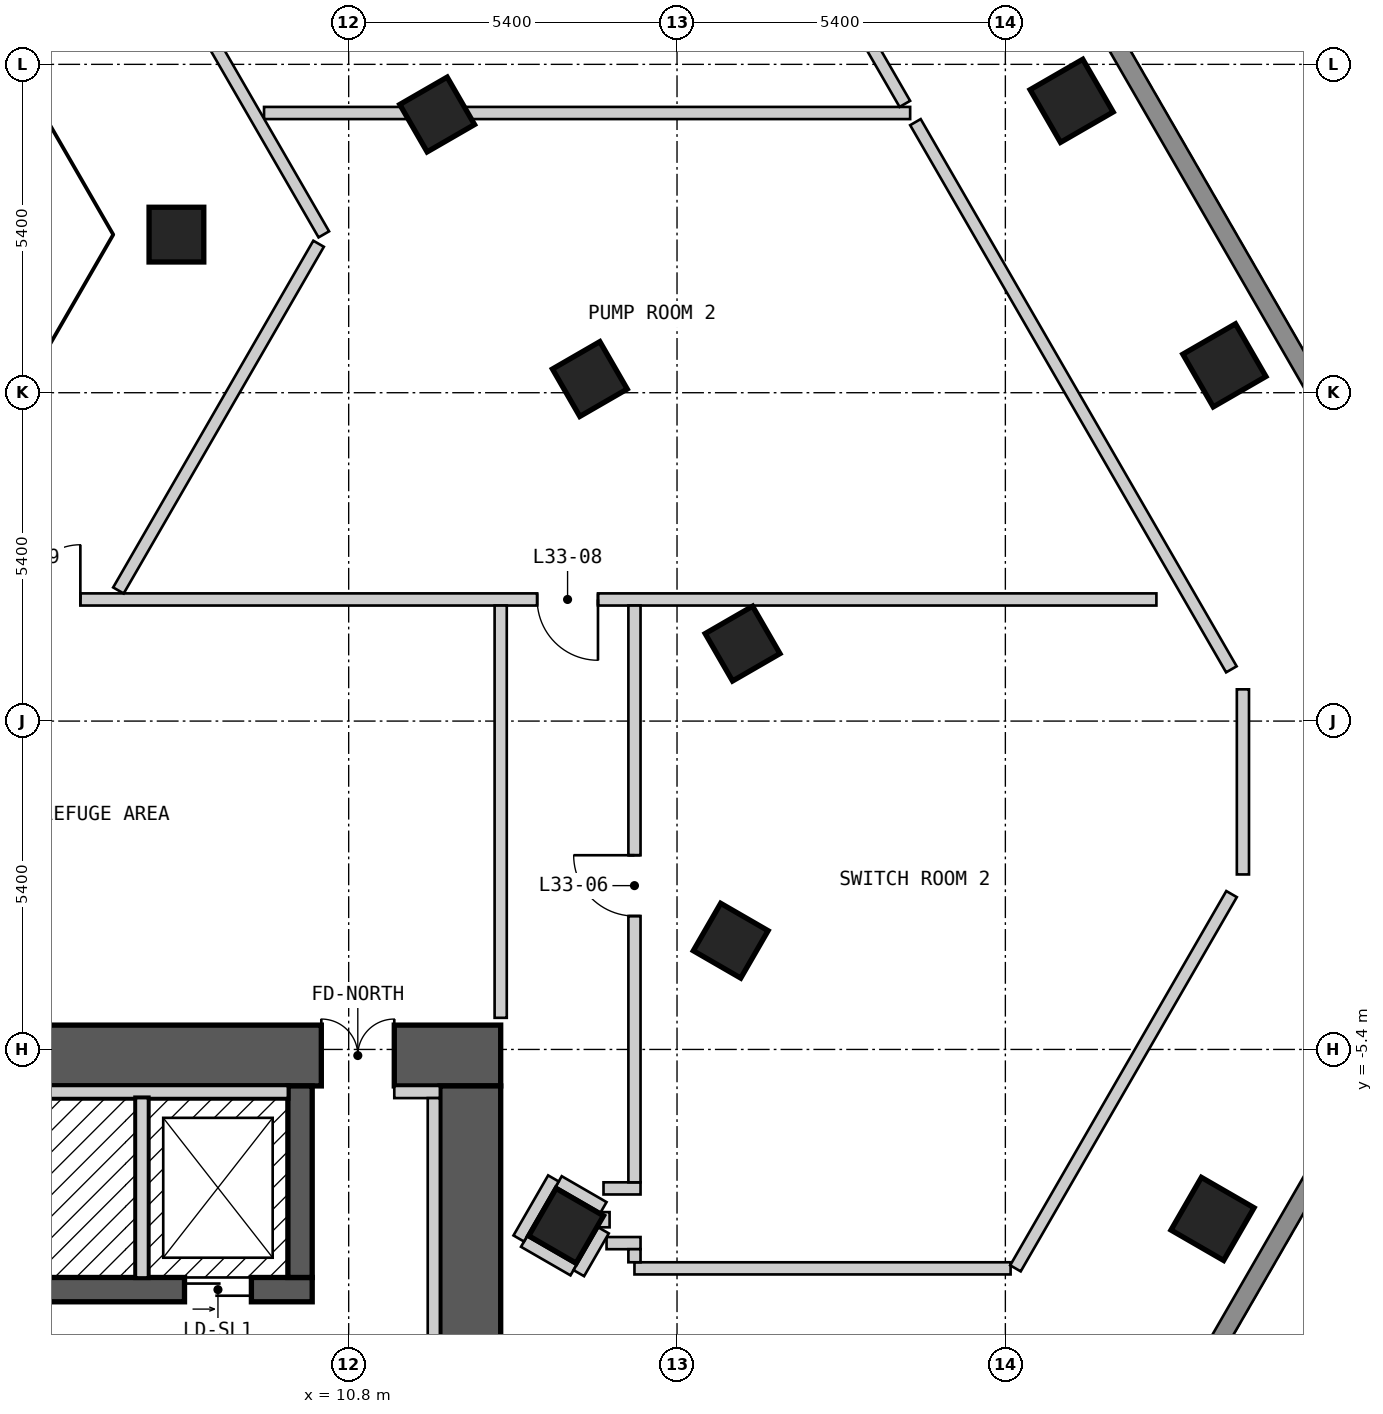
"""IFC4 building model, lengths in metres.
Left out: names, types, materials, properties, quantities, classifications, styles, units other than length and angle.
Written with IfcOpenShell. Run it as: python <this file> out.ifc"""

import sys

from ifc_helpers import new_model, si_unit, direction, frame, frame_2d, origin, origin_2d, place, context, subcontext, project, spatial, polyline, rectangle, outline, extrude, element, fill, save


model = new_model("IFC4")
c1 = context("Model", 3, precision=1e-05, world=origin(), true_north=direction((0.0, 1.0)))
c2 = subcontext(c1, "Body", "Model", "MODEL_VIEW")
j1 = project(units=[si_unit("LENGTHUNIT", "METRE"), si_unit("PLANEANGLEUNIT", "RADIAN")], contexts=[c1])
p1 = place(None, origin())
s1 = spatial("IfcSite", under=j1, at=p1, CompositionType="ELEMENT")
p2 = place(p1, origin())
s2 = spatial("IfcBuilding", under=s1, at=p2, CompositionType="ELEMENT")
p3 = place(p2, frame((0.0, 0.0, 108.0)))
s3 = spatial("IfcBuildingStorey", under=s2, at=p3, CompositionType="ELEMENT", Elevation=108.0)
p4 = place(p3, frame((25.007, -8.187, 0.0), z_axis=(0.0, 0.0, 1.0), x_axis=(0.5, 0.866025403784, 0.0)))
e1 = element("IfcColumn", 1, at=p4, inside=s3, PredefinedType="COLUMN", context=c2, shape_type="SweptSolid", body=[
    extrude(rectangle(XDim=1.0, YDim=1.0, at=origin_2d()), origin(), (0.0, 0.0, 1.0), 2.6),
])
p5 = place(p3, frame((25.202, 5.85, 0.0), z_axis=(0.0, 0.0, 1.0), x_axis=(-0.5, 0.866025403784, 0.0)))
e2 = element("IfcColumn", 2, at=p5, inside=s3, PredefinedType="COLUMN", context=c2, shape_type="SweptSolid", body=[
    extrude(rectangle(XDim=1.0, YDim=1.0, at=origin_2d()), origin(), (0.0, 0.0, 1.0), 3.6),
])
p6 = place(p3, frame((22.69, 10.2, 0.0), z_axis=(0.0, 0.0, 1.0), x_axis=(-0.5, 0.866025403784, 0.0)))
e3 = element("IfcColumn", 3, at=p6, inside=s3, PredefinedType="COLUMN", context=c2, shape_type="SweptSolid", body=[
    extrude(rectangle(XDim=1.0, YDim=1.0, at=origin_2d()), origin(), (0.0, 0.0, 1.0), 2.6),
])
for number, where, z_axis, x_axis in (
    (4, (14.376, -8.3, 0.0), (0.0, 0.0, 1.0), (0.5, 0.866, 0.0)),
    (5, (17.083, -3.612, 0.0), (0.0, 0.0, 1.0), (0.5, 0.866, 0.0)),
):
    element("IfcColumn", number, at=place(p3, frame(where, z_axis=z_axis, x_axis=x_axis)), inside=s3, PredefinedType="COLUMN", context=c2, shape_type="SweptSolid", body=[
        extrude(rectangle(XDim=0.9, YDim=0.9, at=origin_2d()), origin(), (0.0, 0.0, 1.0), 2.6),
    ])
p7 = place(p3, frame((17.278, 1.274, 0.0), z_axis=(0.0, 0.0, 1.0), x_axis=(-0.5, 0.866025403784, 0.0)))
e6 = element("IfcColumn", 6, at=p7, inside=s3, PredefinedType="COLUMN", context=c2, shape_type="SweptSolid", body=[
    extrude(rectangle(XDim=0.9, YDim=0.9, at=origin_2d()), origin(), (0.0, 0.0, 1.0), 3.6),
])
for number, where, z_axis, x_axis in (
    (7, (14.766, 5.625, 0.0), (0.0, 0.0, 1.0), (-0.5, 0.866, 0.0)),
    (8, (12.255, 9.975, 0.0), (0.0, 0.0, 1.0), (-0.5, 0.866, 0.0)),
):
    element("IfcColumn", number, at=place(p3, frame(where, z_axis=z_axis, x_axis=x_axis)), inside=s3, PredefinedType="COLUMN", context=c2, shape_type="SweptSolid", body=[
        extrude(rectangle(XDim=0.9, YDim=0.9, at=origin_2d()), origin(), (0.0, 0.0, 1.0), 2.6),
    ])
p8 = place(p3, frame((7.967, 8.0, 0.0), z_axis=(0.0, 0.0, 1.0), x_axis=(1.0, 0.0, 0.0)))
e9 = element("IfcColumn", 9, at=p8, inside=s3, PredefinedType="COLUMN", context=c2, shape_type="SweptSolid", body=[
    extrude(rectangle(XDim=0.9, YDim=0.9, at=origin_2d()), origin(), (0.0, 0.0, 1.0), 3.6),
])
p9 = place(p3, frame((-13.3, -5.5, 0.0), z_axis=(0.0, 0.0, 1.0), x_axis=(1.0, 0.0, 0.0)))
e10 = element("IfcWall", 10, at=p9, inside=s3, PredefinedType="SHEAR", context=c2, shape_type="SweptSolid", body=[
    extrude(rectangle(XDim=26.6, YDim=1.0, at=frame_2d((13.3, 0.0))), origin(), (0.0, 0.0, 1.0), 2.6),
])
p10 = place(p9, frame((23.65, 0.0, 0.0)))
e11 = element("IfcOpeningElement", 11, at=p10, cuts=e10, PredefinedType="OPENING", context=c2, shape_type="SweptSolid", body=[
    extrude(rectangle(XDim=1.2, YDim=2.1, at=frame_2d((0.6, 1.05))), frame((0.0, 0.51, 0.0), z_axis=(0.0, -1.0, 0.0), x_axis=(1.0, 0.0, 0.0)), (0.0, 0.0, 1.0), 1.02),
])
p11 = place(p3, frame((12.8, -18.0, 0.0), z_axis=(0.0, 0.0, 1.0), x_axis=(0.0, 1.0, 0.0)))
e12 = element("IfcWall", 12, at=p11, inside=s3, PredefinedType="SHEAR", context=c2, shape_type="SweptSolid", body=[
    extrude(rectangle(XDim=12.0, YDim=1.0, at=frame_2d((6.0, 0.0))), origin(), (0.0, 0.0, 1.0), 2.6),
])
p12 = place(p3, frame((-12.3, -9.35, 0.0), z_axis=(0.0, 0.0, 1.0), x_axis=(1.0, 0.0, 0.0)))
e13 = element("IfcWall", 13, at=p12, inside=s3, PredefinedType="SHEAR", context=c2, shape_type="SweptSolid", body=[
    extrude(rectangle(XDim=22.5, YDim=0.4, at=frame_2d((11.25, 0.0))), origin(), (0.0, 0.0, 1.0), 2.6),
])
p13 = place(p12, frame((0.9, 0.0, 0.0)))
e14 = element("IfcOpeningElement", 14, at=p13, cuts=e13, PredefinedType="OPENING", context=c2, shape_type="SweptSolid", body=[
    extrude(rectangle(XDim=1.1, YDim=2.1, at=frame_2d((0.55, 1.05))), frame((0.0, 0.21, 0.0), z_axis=(0.0, -1.0, 0.0), x_axis=(1.0, 0.0, 0.0)), (0.0, 0.0, 1.0), 0.42),
])
p14 = place(p12, frame((3.7, 0.0, 0.0)))
e15 = element("IfcOpeningElement", 15, at=p14, cuts=e13, PredefinedType="OPENING", context=c2, shape_type="SweptSolid", body=[
    extrude(rectangle(XDim=1.1, YDim=2.1, at=frame_2d((0.55, 1.05))), frame((0.0, 0.21, 0.0), z_axis=(0.0, -1.0, 0.0), x_axis=(1.0, 0.0, 0.0)), (0.0, 0.0, 1.0), 0.42),
])
p15 = place(p12, frame((20.4, 0.0, 0.0)))
e16 = element("IfcOpeningElement", 16, at=p15, cuts=e13, PredefinedType="OPENING", context=c2, shape_type="SweptSolid", body=[
    extrude(rectangle(XDim=1.1, YDim=2.1, at=frame_2d((0.55, 1.05))), frame((0.0, 0.21, 0.0), z_axis=(0.0, -1.0, 0.0), x_axis=(1.0, 0.0, 0.0)), (0.0, 0.0, 1.0), 0.42),
])
p16 = place(p3, frame((10.0, -9.15, 0.0), z_axis=(0.0, 0.0, 1.0), x_axis=(0.0, 1.0, 0.0)))
e17 = element("IfcWall", 17, at=p16, inside=s3, PredefinedType="SHEAR", context=c2, shape_type="SweptSolid", body=[
    extrude(rectangle(XDim=3.15, YDim=0.4, at=frame_2d((1.575, 0.0))), origin(), (0.0, 0.0, 1.0), 2.6),
])
p17 = place(p3, frame((17.479, -23.425, 0.0), z_axis=(0.0, 0.0, 1.0), x_axis=(0.500035407905, 0.866004960056, 0.0)))
e18 = element("IfcWall", 18, at=p17, inside=s3, PredefinedType="SOLIDWALL", context=c2, shape_type="SweptSolid", body=[
    extrude(outline(polyline([(0.0, -0.15), (23.094, -0.15), (23.014, 0.15), (0.08, 0.15), (0.0, -0.15)])), origin(), (0.0, 0.0, 1.0), 2.6),
])
p18 = place(p3, frame((29.027, 1.425, 0.0), z_axis=(0.0, 0.0, 1.0), x_axis=(-0.500027479704, 0.866009537788, 0.0)))
e19 = element("IfcWall", 19, at=p18, inside=s3, PredefinedType="SOLIDWALL", context=c2, shape_type="SweptSolid", body=[
    extrude(outline(polyline([(0.0, -0.15), (26.559, -0.15), (26.478, 0.15), (0.08, 0.15), (0.0, -0.15)])), origin(), (0.0, 0.0, 1.0), 2.6),
])
p19 = place(p3, frame((15.5, -9.0, 0.0), z_axis=(0.0, 0.0, 1.0), x_axis=(1.0, 0.0, 0.0)))
e20 = element("IfcWall", 20, at=p19, inside=s3, PredefinedType="SOLIDWALL", context=c2, shape_type="SweptSolid", body=[
    extrude(rectangle(XDim=6.186, YDim=0.2, at=frame_2d((3.093, 0.0))), origin(), (0.0, 0.0, 1.0), 2.6),
])
p20 = place(p3, frame((15.041, -8.585, 0.0), z_axis=(0.0, 0.0, 1.0), x_axis=(1.0, 0.0, 0.0)))
e21 = element("IfcWall", 21, at=p20, inside=s3, PredefinedType="SOLIDWALL", context=c2, shape_type="SweptSolid", body=[
    extrude(rectangle(XDim=0.559, YDim=0.2, at=frame_2d((0.28, 0.0))), origin(), (0.0, 0.0, 1.0), 2.6),
])
p21 = place(p3, frame((14.991, -7.685, 0.0), z_axis=(0.0, 0.0, 1.0), x_axis=(1.0, 0.0, 0.0)))
e22 = element("IfcWall", 22, at=p21, inside=s3, PredefinedType="SOLIDWALL", context=c2, shape_type="SweptSolid", body=[
    extrude(rectangle(XDim=0.609, YDim=0.2, at=frame_2d((0.305, 0.0))), origin(), (0.0, 0.0, 1.0), 2.6),
])
p22 = place(p3, frame((-16.592, 2.0, 0.0), z_axis=(0.0, 0.0, 1.0), x_axis=(1.0, 0.0, 0.0)))
e23 = element("IfcWall", 23, at=p22, inside=s3, PredefinedType="SOLIDWALL", context=c2, shape_type="SweptSolid", body=[
    extrude(rectangle(XDim=40.676, YDim=0.2, at=frame_2d((20.338, 0.0))), origin(), (0.0, 0.0, 1.0), 2.6),
])
p23 = place(p22, frame((0.546, 0.0, 0.0)))
e24 = element("IfcOpeningElement", 24, at=p23, cuts=e23, PredefinedType="OPENING", context=c2, shape_type="SweptSolid", body=[
    extrude(rectangle(XDim=1.8, YDim=2.1, at=frame_2d((0.9, 1.05))), frame((0.0, 0.11, 0.0), z_axis=(0.0, -1.0, 0.0), x_axis=(1.0, 0.0, 0.0)), (0.0, 0.0, 1.0), 0.22),
])
p24 = place(p22, frame((30.492, 0.0, 0.0)))
e25 = element("IfcOpeningElement", 25, at=p24, cuts=e23, PredefinedType="OPENING", context=c2, shape_type="SweptSolid", body=[
    extrude(rectangle(XDim=1.0, YDim=2.1, at=frame_2d((0.5, 1.05))), frame((0.0, 0.11, 0.0), z_axis=(0.0, -1.0, 0.0), x_axis=(1.0, 0.0, 0.0)), (0.0, 0.0, 1.0), 0.22),
])
p25 = place(p22, frame((21.179, 0.0, 0.0)))
e26 = element("IfcOpeningElement", 26, at=p25, cuts=e23, PredefinedType="OPENING", context=c2, shape_type="SweptSolid", body=[
    extrude(rectangle(XDim=1.8, YDim=2.1, at=frame_2d((0.9, 1.05))), frame((0.0, 0.11, 0.0), z_axis=(0.0, -1.0, 0.0), x_axis=(1.0, 0.0, 0.0)), (0.0, 0.0, 1.0), 0.22),
])
p26 = place(p3, frame((9.408, 10.0, 0.0), z_axis=(0.0, 0.0, 1.0), x_axis=(1.0, 0.0, 0.0)))
e27 = element("IfcWall", 27, at=p26, inside=s3, PredefinedType="SOLIDWALL", context=c2, shape_type="SweptSolid", body=[
    extrude(rectangle(XDim=10.626, YDim=0.2, at=frame_2d((5.313, 0.0))), origin(), (0.0, 0.0, 1.0), 2.6),
])
p27 = place(p3, frame((13.3, -4.88, 0.0), z_axis=(0.0, 0.0, 1.0), x_axis=(0.0, 1.0, 0.0)))
e28 = element("IfcWall", 28, at=p27, inside=s3, PredefinedType="PARTITIONING", context=c2, shape_type="SweptSolid", body=[
    extrude(rectangle(XDim=6.78, YDim=0.2, at=frame_2d((3.39, 0.0))), origin(), (0.0, 0.0, 1.0), 2.6),
])
p28 = place(p3, frame((14.991, -8.325, 0.0), z_axis=(0.0, 0.0, 1.0), x_axis=(0.0, 1.0, 0.0)))
e29 = element("IfcWall", 29, at=p28, inside=s3, PredefinedType="SOLIDWALL", context=c2, shape_type="SweptSolid", body=[
    extrude(rectangle(XDim=0.25, YDim=0.2, at=frame_2d((0.125, 0.0))), origin(), (0.0, 0.0, 1.0), 2.6),
])
p29 = place(p3, frame((15.5, -8.9, 0.0), z_axis=(0.0, 0.0, 1.0), x_axis=(0.0, 1.0, 0.0)))
e30 = element("IfcWall", 30, at=p29, inside=s3, PredefinedType="SOLIDWALL", context=c2, shape_type="SweptSolid", body=[
    extrude(rectangle(XDim=0.215, YDim=0.2, at=frame_2d((0.107, 0.0))), origin(), (0.0, 0.0, 1.0), 2.6),
])
p30 = place(p3, frame((15.5, -7.585, 0.0), z_axis=(0.0, 0.0, 1.0), x_axis=(0.0, 1.0, 0.0)))
e31 = element("IfcWall", 31, at=p30, inside=s3, PredefinedType="SOLIDWALL", context=c2, shape_type="SweptSolid", body=[
    extrude(rectangle(XDim=9.485, YDim=0.2, at=frame_2d((4.742, 0.0))), origin(), (0.0, 0.0, 1.0), 2.6),
])
p31 = place(p30, frame((5.379, 0.0, 0.0), z_axis=(0.0, 0.0, 1.0), x_axis=(-1.0, 0.0, 0.0)))
e32 = element("IfcOpeningElement", 32, at=p31, cuts=e31, PredefinedType="OPENING", context=c2, shape_type="SweptSolid", body=[
    extrude(rectangle(XDim=1.0, YDim=2.1, at=frame_2d((0.5, 1.05))), frame((0.0, 0.11, 0.0), z_axis=(0.0, -1.0, 0.0), x_axis=(1.0, 0.0, 0.0)), (0.0, 0.0, 1.0), 0.22),
])
p32 = place(p3, frame((25.507, -2.522, 0.0), z_axis=(0.0, 0.0, 1.0), x_axis=(0.0, 1.0, 0.0)))
e33 = element("IfcWall", 33, at=p32, inside=s3, PredefinedType="SOLIDWALL", context=c2, shape_type="SweptSolid", body=[
    extrude(rectangle(XDim=3.044, YDim=0.2, at=frame_2d((1.522, 0.0))), origin(), (0.0, 0.0, 1.0), 2.6),
])
p33 = place(p3, frame((13.684, -8.559, 0.0), z_axis=(0.0, 0.0, 1.0), x_axis=(0.866012558475, -0.500022248069, 0.0)))
e34 = element("IfcWall", 34, at=p33, inside=s3, PredefinedType="SOLIDWALL", context=c2, shape_type="SweptSolid", body=[
    extrude(rectangle(XDim=0.94, YDim=0.2, at=frame_2d((0.47, 0.0))), origin(), (0.0, 0.0, 1.0), 2.6),
])
p34 = place(p3, frame((14.254, -7.571, 0.0), z_axis=(0.0, 0.0, 1.0), x_axis=(0.865779484054, -0.500425703768, 0.0)))
e35 = element("IfcWall", 35, at=p34, inside=s3, PredefinedType="SOLIDWALL", context=c2, shape_type="SweptSolid", body=[
    extrude(rectangle(XDim=0.851, YDim=0.2, at=frame_2d((0.426, 0.0))), origin(), (0.0, 0.0, 1.0), 2.6),
])
p35 = place(p3, frame((5.196, 17.0, 0.0), z_axis=(0.0, 0.0, 1.0), x_axis=(0.500084554436, -0.865976580754, 0.0)))
e36 = element("IfcWall", 36, at=p35, inside=s3, PredefinedType="SOLIDWALL", context=c2, shape_type="SweptSolid", body=[
    extrude(rectangle(XDim=10.388, YDim=0.2, at=frame_2d((5.194, 0.0))), origin(), (0.0, 0.0, 1.0), 2.6),
])
p36 = place(p3, frame((15.502, 17.85, 0.0), z_axis=(0.0, 0.0, 1.0), x_axis=(0.499945887847, -0.866056643197, 0.0)))
e37 = element("IfcWall", 37, at=p36, inside=s3, PredefinedType="PARTITIONING", context=c2, shape_type="SweptSolid", body=[
    extrude(rectangle(XDim=8.891, YDim=0.2, at=frame_2d((4.446, 0.0))), origin(), (0.0, 0.0, 1.0), 2.6),
])
p37 = place(p3, frame((20.121, 9.85, 0.0), z_axis=(0.0, 0.0, 1.0), x_axis=(0.500015313995, -0.866016562065, 0.0)))
e38 = element("IfcWall", 38, at=p37, inside=s3, PredefinedType="SOLIDWALL", context=c2, shape_type="SweptSolid", body=[
    extrude(rectangle(XDim=10.391, YDim=0.2, at=frame_2d((5.196, 0.0))), origin(), (0.0, 0.0, 1.0), 2.6),
])
p38 = place(p3, frame((21.766, -9.0, 0.0), z_axis=(0.0, 0.0, 1.0), x_axis=(0.500036643462, 0.866004246638, 0.0)))
e39 = element("IfcWall", 39, at=p38, inside=s3, PredefinedType="SOLIDWALL", context=c2, shape_type="SweptSolid", body=[
    extrude(rectangle(XDim=7.107, YDim=0.2, at=frame_2d((3.554, 0.0))), origin(), (0.0, 0.0, 1.0), 2.6),
])
p39 = place(p3, frame((7.013, 2.148, 0.0), z_axis=(0.0, 0.0, 1.0), x_axis=(0.499983511822, 0.866034923029, 0.0)))
e40 = element("IfcWall", 40, at=p39, inside=s3, PredefinedType="SOLIDWALL", context=c2, shape_type="SweptSolid", body=[
    extrude(rectangle(XDim=6.584, YDim=0.2, at=frame_2d((3.292, 0.0))), origin(), (0.0, 0.0, 1.0), 2.6),
])
p40 = place(p3, frame((13.597, -8.509, 0.0), z_axis=(0.0, 0.0, 1.0), x_axis=(0.499753333889, 0.8661677697, 0.0)))
e41 = element("IfcWall", 41, at=p40, inside=s3, PredefinedType="SOLIDWALL", context=c2, shape_type="SweptSolid", body=[
    extrude(rectangle(XDim=1.141, YDim=0.2, at=frame_2d((0.57, 0.0))), origin(), (0.0, 0.0, 1.0), 2.6),
])
p41 = place(p3, frame((14.585, -9.079, 0.0), z_axis=(0.0, 0.0, 1.0), x_axis=(0.49953174516, 0.866295582106, 0.0)))
e42 = element("IfcWall", 42, at=p41, inside=s3, PredefinedType="SOLIDWALL", context=c2, shape_type="SweptSolid", body=[
    extrude(rectangle(XDim=0.813, YDim=0.2, at=frame_2d((0.406, 0.0))), origin(), (0.0, 0.0, 1.0), 2.6),
])
p42 = place(p3, frame((-6.3, -6.1, 0.0), z_axis=(0.0, 0.0, 1.0), x_axis=(1.0, 0.0, 0.0)))
e43 = element("IfcWall", 43, at=p42, inside=s3, PredefinedType="SOLIDWALL", context=c2, shape_type="SweptSolid", body=[
    extrude(rectangle(XDim=16.1, YDim=0.2, at=frame_2d((8.05, 0.0))), origin(), (0.0, 0.0, 1.0), 1.4),
])
p43 = place(p3, frame((-6.3, -6.1, 1.7), z_axis=(0.0, 0.0, 1.0), x_axis=(1.0, 0.0, 0.0)))
e44 = element("IfcWall", 44, at=p43, inside=s3, PredefinedType="SOLIDWALL", context=c2, shape_type="SweptSolid", body=[
    extrude(rectangle(XDim=16.1, YDim=0.2, at=frame_2d((8.05, 0.0))), origin(), (0.0, 0.0, 1.0), 0.9),
])
p44 = place(p3, frame((7.4, -9.15, 0.0), z_axis=(0.0, 0.0, 1.0), x_axis=(0.0, 1.0, 0.0)))
e45 = element("IfcWall", 45, at=p44, inside=s3, PredefinedType="SOLIDWALL", context=c2, shape_type="SweptSolid", body=[
    extrude(rectangle(XDim=2.95, YDim=0.2, at=frame_2d((1.475, 0.0))), origin(), (0.0, 0.0, 1.0), 1.4),
])
p45 = place(p3, frame((7.4, -9.15, 1.7), z_axis=(0.0, 0.0, 1.0), x_axis=(0.0, 1.0, 0.0)))
e46 = element("IfcWall", 46, at=p45, inside=s3, PredefinedType="SOLIDWALL", context=c2, shape_type="SweptSolid", body=[
    extrude(rectangle(XDim=2.95, YDim=0.2, at=frame_2d((1.475, 0.0))), origin(), (0.0, 0.0, 1.0), 0.9),
])
p46 = place(p3, frame((11.55, -6.1, 0.0), z_axis=(0.0, 0.0, 1.0), x_axis=(1.0, 0.0, 0.0)))
e47 = element("IfcWall", 47, at=p46, inside=s3, PredefinedType="PARTITIONING", context=c2, shape_type="SweptSolid", body=[
    extrude(rectangle(XDim=0.75, YDim=0.2, at=frame_2d((0.375, 0.0))), origin(), (0.0, 0.0, 1.0), 2.6),
])
p47 = place(p3, frame((12.2, -14.45, 0.0), z_axis=(0.0, 0.0, 1.0), x_axis=(0.0, 1.0, 0.0)))
e48 = element("IfcWall", 48, at=p47, inside=s3, PredefinedType="PARTITIONING", context=c2, shape_type="SweptSolid", body=[
    extrude(rectangle(XDim=8.25, YDim=0.2, at=frame_2d((4.125, 0.0))), origin(), (0.0, 0.0, 1.0), 2.6),
])
p48 = place(p31, origin())
e49 = element("IfcDoor", 49, at=p48, inside=s3, OperationType="SINGLE_SWING_LEFT", PredefinedType="DOOR", context=c2, shape_type="SweptSolid", body=[
    extrude(rectangle(XDim=1.0, YDim=2.1, at=frame_2d((0.5, 1.05))), frame((0.0, 0.025, 0.0), z_axis=(0.0, -1.0, 0.0), x_axis=(1.0, 0.0, 0.0)), (0.0, 0.0, 1.0), 0.05),
])
fill(e32, e49)
p49 = place(p24, origin())
e50 = element("IfcDoor", 50, at=p49, inside=s3, OperationType="SINGLE_SWING_RIGHT", PredefinedType="DOOR", context=c2, shape_type="SweptSolid", body=[
    extrude(rectangle(XDim=1.0, YDim=2.1, at=frame_2d((0.5, 1.05))), frame((0.0, 0.025, 0.0), z_axis=(0.0, -1.0, 0.0), x_axis=(1.0, 0.0, 0.0)), (0.0, 0.0, 1.0), 0.05),
])
fill(e25, e50)
p50 = place(p25, origin())
e51 = element("IfcDoor", 51, at=p50, inside=s3, OperationType="DOUBLE_DOOR_SINGLE_SWING", PredefinedType="DOOR", context=c2, shape_type="SweptSolid", body=[
    extrude(rectangle(XDim=1.8, YDim=2.1, at=frame_2d((0.9, 1.05))), frame((0.0, 0.025, 0.0), z_axis=(0.0, -1.0, 0.0), x_axis=(1.0, 0.0, 0.0)), (0.0, 0.0, 1.0), 0.05),
])
fill(e26, e51)
p51 = place(p15, origin())
e52 = element("IfcDoor", 52, at=p51, inside=s3, OperationType="DOUBLE_DOOR_SLIDING", PredefinedType="DOOR", context=c2, shape_type="SweptSolid", body=[
    extrude(rectangle(XDim=1.1, YDim=2.1, at=frame_2d((0.55, 1.05))), frame((0.0, 0.025, 0.0), z_axis=(0.0, -1.0, 0.0), x_axis=(1.0, 0.0, 0.0)), (0.0, 0.0, 1.0), 0.05),
])
fill(e16, e52)
p52 = place(p10, origin())
e53 = element("IfcDoor", 53, at=p52, inside=s3, OperationType="DOUBLE_DOOR_SINGLE_SWING", PredefinedType="DOOR", context=c2, shape_type="SweptSolid", body=[
    extrude(rectangle(XDim=1.2, YDim=2.1, at=frame_2d((0.6, 1.05))), frame((0.0, 0.025, 0.0), z_axis=(0.0, -1.0, 0.0), x_axis=(1.0, 0.0, 0.0)), (0.0, 0.0, 1.0), 0.05),
])
fill(e11, e53)
save(model, sys.argv[1])
